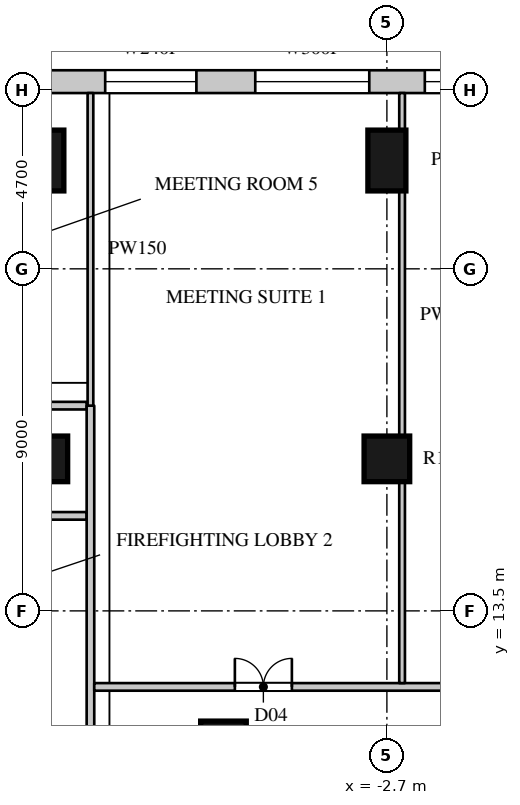
"""IFC4 building model, lengths in metres.
Left out: names, types, materials, properties, quantities, classifications, styles, units other than length and angle.
Written with IfcOpenShell. Run it as: python <this file> out.ifc"""

import sys

from ifc_helpers import new_model, si_unit, direction, frame, frame_2d, origin, origin_2d, place, context, subcontext, project, spatial, rectangle, circle, extrude, element, fill, save


model = new_model("IFC4")
c1 = context("Model", 3, precision=1e-05, world=origin(), true_north=direction((0.0, 1.0)))
c2 = subcontext(c1, "Body", "Model", "MODEL_VIEW")
j1 = project(units=[si_unit("LENGTHUNIT", "METRE"), si_unit("PLANEANGLEUNIT", "RADIAN")], contexts=[c1])
p1 = place(None, origin())
s1 = spatial("IfcSite", under=j1, at=p1, CompositionType="ELEMENT")
p2 = place(p1, origin())
s2 = spatial("IfcBuilding", under=s1, at=p2, CompositionType="ELEMENT")
p3 = place(p2, frame((0.0, 0.0, 36.0)))
s3 = spatial("IfcBuildingStorey", under=s2, at=p3, CompositionType="ELEMENT", Elevation=36.0)
for number, where, z_axis, x_axis in (
    (1, (-2.7, 25.35, 0.0), (0.0, 0.0, 1.0), (-1.0, 0.0, 0.0)),
    (2, (-11.7, 25.35, 0.0), (0.0, 0.0, 1.0), (-1.0, 0.0, 0.0)),
):
    element("IfcColumn", number, at=place(p3, frame(where, z_axis=z_axis, x_axis=x_axis)), inside=s3, PredefinedType="COLUMN", context=c2, shape_type="SweptSolid", body=[
        extrude(rectangle(XDim=1.0, YDim=1.6, at=origin_2d()), origin(), (0.0, 0.0, 1.0), 8.0),
    ])
for number, where, z_axis, x_axis in (
    (3, (-11.7, 17.5, 0.0), (0.0, 0.0, 1.0), (1.0, 0.0, 0.0)),
    (4, (-2.7, 17.5, 0.0), (0.0, 0.0, 1.0), (1.0, 0.0, 0.0)),
    (5, (-7.0, 10.0, 0.0), (0.0, 0.0, 1.0), (1.0, 0.0, 0.0)),
):
    element("IfcColumn", number, at=place(p3, frame(where, z_axis=z_axis, x_axis=x_axis)), inside=s3, PredefinedType="COLUMN", context=c2, shape_type="SweptSolid", body=[
        extrude(circle(Radius=0.6, at=origin_2d()), origin(), (0.0, 0.0, 1.0), 8.0),
    ])
p4 = place(p3, frame((24.334, 27.425, 0.0), z_axis=(0.0, 0.0, 1.0), x_axis=(-1.0, 0.0, 0.0)))
e6 = element("IfcWall", 6, at=p4, inside=s3, PredefinedType="ELEMENTEDWALL", context=c2, shape_type="SweptSolid", body=[
    extrude(rectangle(XDim=53.534, YDim=0.6, at=frame_2d((26.767, 0.0))), origin(), (0.0, 0.0, 1.0), 7.6),
])
p5 = place(p4, frame((5.192, 0.0, 1.5)))
e7 = element("IfcOpeningElement", 7, at=p5, cuts=e6, PredefinedType="OPENING", context=c2, shape_type="SweptSolid", body=[
    extrude(rectangle(XDim=3.0, YDim=2.4, at=frame_2d((1.5, 1.2))), frame((0.0, 0.31, 0.0), z_axis=(0.0, -1.0, 0.0), x_axis=(1.0, 0.0, 0.0)), (0.0, 0.0, 1.0), 0.62),
])
p6 = place(p4, frame((14.114, 0.0, 1.5)))
e8 = element("IfcOpeningElement", 8, at=p6, cuts=e6, PredefinedType="OPENING", context=c2, shape_type="SweptSolid", body=[
    extrude(rectangle(XDim=3.0, YDim=2.4, at=frame_2d((1.5, 1.2))), frame((0.0, 0.31, 0.0), z_axis=(0.0, -1.0, 0.0), x_axis=(1.0, 0.0, 0.0)), (0.0, 0.0, 1.0), 0.62),
])
p7 = place(p4, frame((18.575, 0.0, 1.5)))
e9 = element("IfcOpeningElement", 9, at=p7, cuts=e6, PredefinedType="OPENING", context=c2, shape_type="SweptSolid", body=[
    extrude(rectangle(XDim=3.0, YDim=2.4, at=frame_2d((1.5, 1.2))), frame((0.0, 0.31, 0.0), z_axis=(0.0, -1.0, 0.0), x_axis=(1.0, 0.0, 0.0)), (0.0, 0.0, 1.0), 0.62),
])
p8 = place(p4, frame((23.037, 0.0, 1.5)))
e10 = element("IfcOpeningElement", 10, at=p8, cuts=e6, PredefinedType="OPENING", context=c2, shape_type="SweptSolid", body=[
    extrude(rectangle(XDim=3.0, YDim=2.4, at=frame_2d((1.5, 1.2))), frame((0.0, 0.31, 0.0), z_axis=(0.0, -1.0, 0.0), x_axis=(1.0, 0.0, 0.0)), (0.0, 0.0, 1.0), 0.62),
])
p9 = place(p4, frame((27.498, 0.0, 1.5)))
e11 = element("IfcOpeningElement", 11, at=p9, cuts=e6, PredefinedType="OPENING", context=c2, shape_type="SweptSolid", body=[
    extrude(rectangle(XDim=3.0, YDim=2.4, at=frame_2d((1.5, 1.2))), frame((0.0, 0.31, 0.0), z_axis=(0.0, -1.0, 0.0), x_axis=(1.0, 0.0, 0.0)), (0.0, 0.0, 1.0), 0.62),
])
p10 = place(p4, frame((36.42, 0.0, 1.5)))
e12 = element("IfcOpeningElement", 12, at=p10, cuts=e6, PredefinedType="OPENING", context=c2, shape_type="SweptSolid", body=[
    extrude(rectangle(XDim=3.0, YDim=2.4, at=frame_2d((1.5, 1.2))), frame((0.0, 0.31, 0.0), z_axis=(0.0, -1.0, 0.0), x_axis=(1.0, 0.0, 0.0)), (0.0, 0.0, 1.0), 0.62),
])
p11 = place(p4, frame((40.882, 0.0, 1.5)))
e13 = element("IfcOpeningElement", 13, at=p11, cuts=e6, PredefinedType="OPENING", context=c2, shape_type="SweptSolid", body=[
    extrude(rectangle(XDim=3.0, YDim=2.4, at=frame_2d((1.5, 1.2))), frame((0.0, 0.31, 0.0), z_axis=(0.0, -1.0, 0.0), x_axis=(1.0, 0.0, 0.0)), (0.0, 0.0, 1.0), 0.62),
])
p12 = place(p4, frame((45.343, 0.0, 1.5)))
e14 = element("IfcOpeningElement", 14, at=p12, cuts=e6, PredefinedType="OPENING", context=c2, shape_type="SweptSolid", body=[
    extrude(rectangle(XDim=3.0, YDim=2.4, at=frame_2d((1.5, 1.2))), frame((0.0, 0.31, 0.0), z_axis=(0.0, -1.0, 0.0), x_axis=(1.0, 0.0, 0.0)), (0.0, 0.0, 1.0), 0.62),
])
p13 = place(p4, frame((49.804, 0.0, 1.5)))
e15 = element("IfcOpeningElement", 15, at=p13, cuts=e6, PredefinedType="OPENING", context=c2, shape_type="SweptSolid", body=[
    extrude(rectangle(XDim=3.0, YDim=2.4, at=frame_2d((1.5, 1.2))), frame((0.0, 0.31, 0.0), z_axis=(0.0, -1.0, 0.0), x_axis=(1.0, 0.0, 0.0)), (0.0, 0.0, 1.0), 0.62),
])
p14 = place(p4, frame((0.782, 0.0, 1.5)))
e16 = element("IfcOpeningElement", 16, at=p14, cuts=e6, PredefinedType="OPENING", context=c2, shape_type="SweptSolid", body=[
    extrude(rectangle(XDim=1.2, YDim=2.4, at=frame_2d((0.6, 1.2))), frame((0.0, 0.31, 0.0), z_axis=(0.0, -1.0, 0.0), x_axis=(1.0, 0.0, 0.0)), (0.0, 0.0, 1.0), 0.62),
])
p15 = place(p4, frame((2.733, 0.0, 1.5)))
e17 = element("IfcOpeningElement", 17, at=p15, cuts=e6, PredefinedType="OPENING", context=c2, shape_type="SweptSolid", body=[
    extrude(rectangle(XDim=0.9, YDim=2.4, at=frame_2d((0.45, 1.2))), frame((0.0, 0.31, 0.0), z_axis=(0.0, -1.0, 0.0), x_axis=(1.0, 0.0, 0.0)), (0.0, 0.0, 1.0), 0.62),
])
p16 = place(p4, frame((10.194, 0.0, 1.5)))
e18 = element("IfcOpeningElement", 18, at=p16, cuts=e6, PredefinedType="OPENING", context=c2, shape_type="SweptSolid", body=[
    extrude(rectangle(XDim=2.4, YDim=2.4, at=frame_2d((1.2, 1.2))), frame((0.0, 0.31, 0.0), z_axis=(0.0, -1.0, 0.0), x_axis=(1.0, 0.0, 0.0)), (0.0, 0.0, 1.0), 0.62),
])
p17 = place(p4, frame((32.047, 0.0, 1.5)))
e19 = element("IfcOpeningElement", 19, at=p17, cuts=e6, PredefinedType="OPENING", context=c2, shape_type="SweptSolid", body=[
    extrude(rectangle(XDim=2.4, YDim=2.4, at=frame_2d((1.2, 1.2))), frame((0.0, 0.31, 0.0), z_axis=(0.0, -1.0, 0.0), x_axis=(1.0, 0.0, 0.0)), (0.0, 0.0, 1.0), 0.62),
])
p18 = place(p3, frame((-23.869, 18.9, 0.0), z_axis=(0.0, 0.0, 1.0), x_axis=(1.0, 0.0, 0.0)))
e20 = element("IfcWall", 20, at=p18, inside=s3, PredefinedType="PARTITIONING", context=c2, shape_type="SweptSolid", body=[
    extrude(rectangle(XDim=13.269, YDim=0.2, at=frame_2d((6.635, 0.0))), origin(), (0.0, 0.0, 1.0), 7.598),
])
p19 = place(p18, frame((1.6, 0.0, 0.0)))
e21 = element("IfcOpeningElement", 21, at=p19, cuts=e20, PredefinedType="OPENING", context=c2, shape_type="SweptSolid", body=[
    extrude(rectangle(XDim=0.95, YDim=2.2, at=frame_2d((0.475, 1.1))), frame((0.0, 0.11, 0.0), z_axis=(0.0, -1.0, 0.0), x_axis=(1.0, 0.0, 0.0)), (0.0, 0.0, 1.0), 0.22),
])
p20 = place(p18, frame((5.9, 0.0, 0.0)))
e22 = element("IfcOpeningElement", 22, at=p20, cuts=e20, PredefinedType="OPENING", context=c2, shape_type="SweptSolid", body=[
    extrude(rectangle(XDim=0.95, YDim=2.2, at=frame_2d((0.475, 1.1))), frame((0.0, 0.11, 0.0), z_axis=(0.0, -1.0, 0.0), x_axis=(1.0, 0.0, 0.0)), (0.0, 0.0, 1.0), 0.22),
])
p21 = place(p18, frame((10.4, 0.0, 0.0)))
e23 = element("IfcOpeningElement", 23, at=p21, cuts=e20, PredefinedType="OPENING", context=c2, shape_type="SweptSolid", body=[
    extrude(rectangle(XDim=0.95, YDim=2.2, at=frame_2d((0.475, 1.1))), frame((0.0, 0.11, 0.0), z_axis=(0.0, -1.0, 0.0), x_axis=(1.0, 0.0, 0.0)), (0.0, 0.0, 1.0), 0.22),
])
p22 = place(p3, frame((-13.97, 16.0, 0.0), z_axis=(0.0, 0.0, 1.0), x_axis=(1.0, 0.0, 0.0)))
e24 = element("IfcWall", 24, at=p22, inside=s3, PredefinedType="PARTITIONING", context=c2, shape_type="SweptSolid", body=[
    extrude(rectangle(XDim=3.37, YDim=0.2, at=frame_2d((1.685, 0.0))), origin(), (0.0, 0.0, 1.0), 7.598),
])
p23 = place(p3, frame((-10.5, -18.9, 0.0), z_axis=(0.0, 0.0, 1.0), x_axis=(0.0, 1.0, 0.0)))
e25 = element("IfcWall", 25, at=p23, inside=s3, PredefinedType="PARTITIONING", context=c2, shape_type="SweptSolid", body=[
    extrude(rectangle(XDim=37.8, YDim=0.2, at=frame_2d((18.9, 0.0))), origin(), (0.0, 0.0, 1.0), 7.598),
])
p24 = place(p23, frame((18.15, 0.0, 0.0)))
e26 = element("IfcOpeningElement", 26, at=p24, cuts=e25, PredefinedType="OPENING", context=c2, shape_type="SweptSolid", body=[
    extrude(rectangle(XDim=1.5, YDim=2.4, at=frame_2d((0.75, 1.2))), frame((0.0, 0.11, 0.0), z_axis=(0.0, -1.0, 0.0), x_axis=(1.0, 0.0, 0.0)), (0.0, 0.0, 1.0), 0.22),
])
p25 = place(p3, frame((-10.4, 11.5, 0.0), z_axis=(0.0, 0.0, 1.0), x_axis=(1.0, 0.0, 0.0)))
e27 = element("IfcWall", 27, at=p25, inside=s3, PredefinedType="PARTITIONING", context=c2, shape_type="SweptSolid", body=[
    extrude(rectangle(XDim=24.8, YDim=0.2, at=frame_2d((12.4, 0.0))), origin(), (0.0, 0.0, 1.0), 7.598),
])
p26 = place(p25, frame((3.7, 0.0, 0.0)))
e28 = element("IfcOpeningElement", 28, at=p26, cuts=e27, PredefinedType="OPENING", context=c2, shape_type="SweptSolid", body=[
    extrude(rectangle(XDim=1.5, YDim=2.2, at=frame_2d((0.75, 1.1))), frame((0.0, 0.11, 0.0), z_axis=(0.0, -1.0, 0.0), x_axis=(1.0, 0.0, 0.0)), (0.0, 0.0, 1.0), 0.22),
])
p27 = place(p25, frame((11.7, 0.0, 0.0)))
e29 = element("IfcOpeningElement", 29, at=p27, cuts=e27, PredefinedType="OPENING", context=c2, shape_type="SweptSolid", body=[
    extrude(rectangle(XDim=1.5, YDim=2.2, at=frame_2d((0.75, 1.1))), frame((0.0, 0.11, 0.0), z_axis=(0.0, -1.0, 0.0), x_axis=(1.0, 0.0, 0.0)), (0.0, 0.0, 1.0), 0.22),
])
p28 = place(p25, frame((19.9, 0.0, 0.0)))
e30 = element("IfcOpeningElement", 30, at=p28, cuts=e27, PredefinedType="OPENING", context=c2, shape_type="SweptSolid", body=[
    extrude(rectangle(XDim=1.5, YDim=2.2, at=frame_2d((0.75, 1.1))), frame((0.0, 0.11, 0.0), z_axis=(0.0, -1.0, 0.0), x_axis=(1.0, 0.0, 0.0)), (0.0, 0.0, 1.0), 0.22),
])
p29 = place(p3, frame((-10.5, 18.9, 0.0), z_axis=(0.0, 0.0, 1.0), x_axis=(0.0, 1.0, 0.0)))
e31 = element("IfcWall", 31, at=p29, inside=s3, PredefinedType="PARTITIONING", context=c2, shape_type="SweptSolid", body=[
    extrude(rectangle(XDim=8.225, YDim=0.15, at=frame_2d((4.113, 0.0))), origin(), (0.0, 0.0, 1.0), 7.598),
])
p30 = place(p3, frame((-2.3, 11.6, 0.0), z_axis=(0.0, 0.0, 1.0), x_axis=(0.0, 1.0, 0.0)))
e32 = element("IfcWall", 32, at=p30, inside=s3, PredefinedType="PARTITIONING", context=c2, shape_type="SweptSolid", body=[
    extrude(rectangle(XDim=5.406, YDim=0.15, at=frame_2d((2.703, 0.0))), origin(), (0.0, 0.0, 1.0), 7.598),
])
p31 = place(p3, frame((-2.3, 17.994, 0.0), z_axis=(0.0, 0.0, 1.0), x_axis=(0.0, 1.0, 0.0)))
e33 = element("IfcWall", 33, at=p31, inside=s3, PredefinedType="PARTITIONING", context=c2, shape_type="SweptSolid", body=[
    extrude(rectangle(XDim=6.556, YDim=0.15, at=frame_2d((3.278, 0.0))), origin(), (0.0, 0.0, 1.0), 7.598),
])
p32 = place(p3, frame((-2.3, 26.15, 0.0), z_axis=(0.0, 0.0, 1.0), x_axis=(0.0, 1.0, 0.0)))
e34 = element("IfcWall", 34, at=p32, inside=s3, PredefinedType="PARTITIONING", context=c2, shape_type="SweptSolid", body=[
    extrude(rectangle(XDim=0.975, YDim=0.15, at=frame_2d((0.488, 0.0))), origin(), (0.0, 0.0, 1.0), 7.598),
])
p33 = place(p8, origin())
e35 = element("IfcWindow", 35, at=p33, inside=s3, PartitioningType="SINGLE_PANEL", PredefinedType="WINDOW", context=c2, shape_type="SweptSolid", body=[
    extrude(rectangle(XDim=3.0, YDim=2.4, at=frame_2d((1.5, 1.2))), frame((0.0, 0.06, 0.0), z_axis=(0.0, -1.0, 0.0), x_axis=(1.0, 0.0, 0.0)), (0.0, 0.0, 1.0), 0.06),
])
fill(e10, e35)
p34 = place(p9, origin())
e36 = element("IfcWindow", 36, at=p34, inside=s3, PartitioningType="SINGLE_PANEL", PredefinedType="WINDOW", context=c2, shape_type="SweptSolid", body=[
    extrude(rectangle(XDim=3.0, YDim=2.4, at=frame_2d((1.5, 1.2))), frame((0.0, 0.06, 0.0), z_axis=(0.0, -1.0, 0.0), x_axis=(1.0, 0.0, 0.0)), (0.0, 0.0, 1.0), 0.06),
])
fill(e11, e36)
p35 = place(p26, origin())
e37 = element("IfcDoor", 37, at=p35, inside=s3, OperationType="DOUBLE_DOOR_SINGLE_SWING", PredefinedType="DOOR", context=c2, shape_type="SweptSolid", body=[
    extrude(rectangle(XDim=1.5, YDim=2.2, at=frame_2d((0.75, 1.1))), frame((0.0, 0.025, 0.0), z_axis=(0.0, -1.0, 0.0), x_axis=(1.0, 0.0, 0.0)), (0.0, 0.0, 1.0), 0.05),
])
fill(e28, e37)
p36 = place(p17, origin())
e38 = element("IfcWindow", 38, at=p36, inside=s3, PartitioningType="SINGLE_PANEL", PredefinedType="WINDOW", context=c2, shape_type="SweptSolid", body=[
    extrude(rectangle(XDim=2.4, YDim=2.4, at=frame_2d((1.2, 1.2))), frame((0.0, 0.06, 0.0), z_axis=(0.0, -1.0, 0.0), x_axis=(1.0, 0.0, 0.0)), (0.0, 0.0, 1.0), 0.06),
])
fill(e19, e38)
save(model, sys.argv[1])
